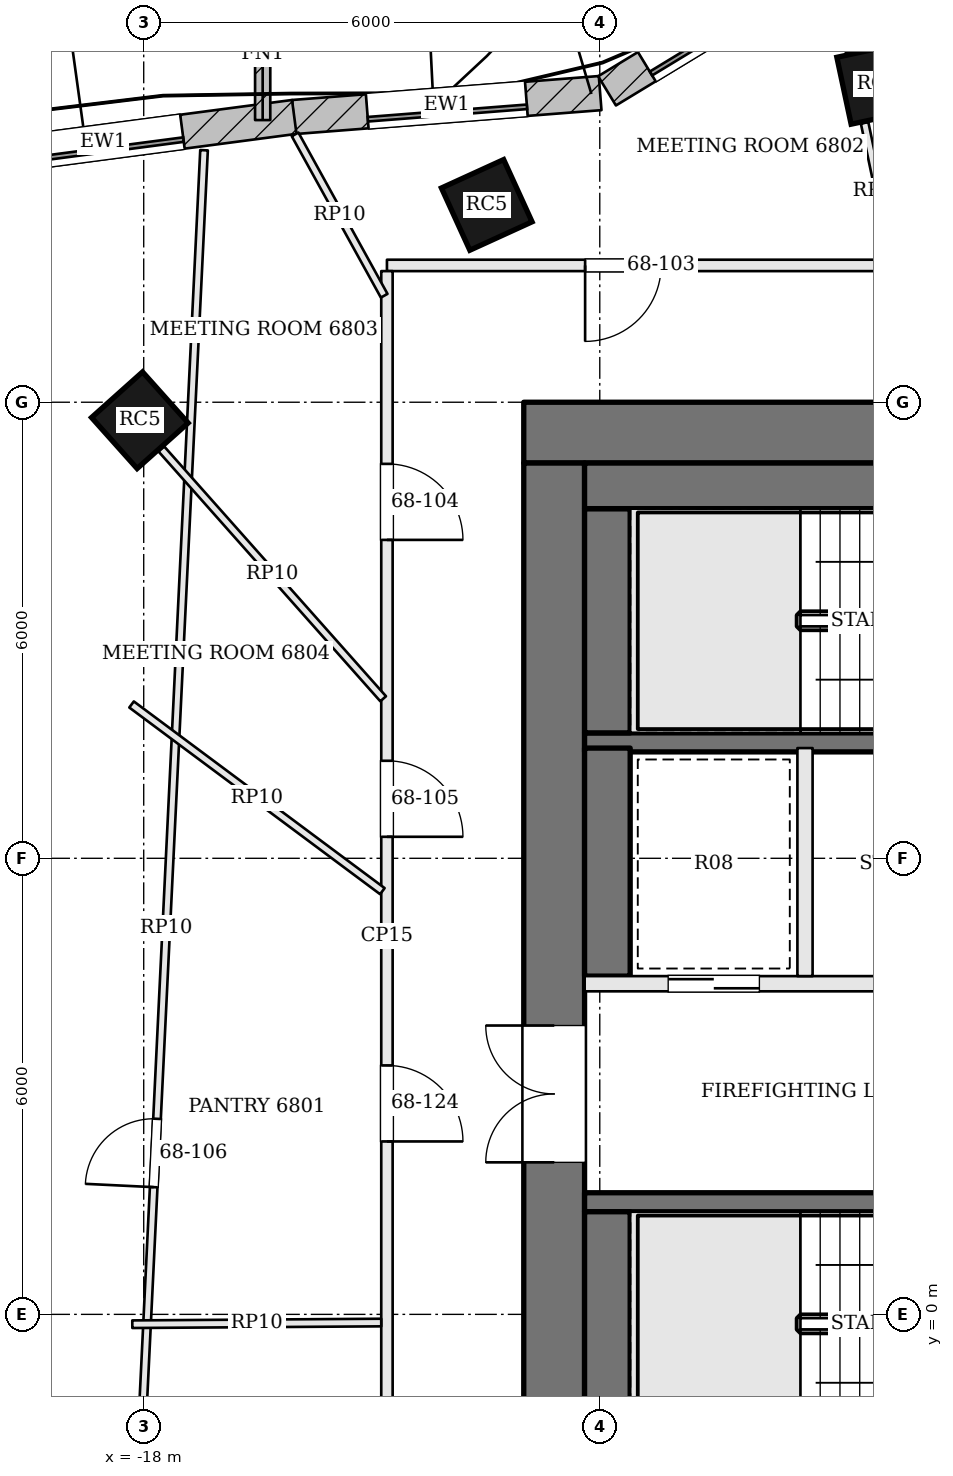
"""IFC4 building model, lengths in metres.
Left out: names, types, materials, properties, quantities, classifications, styles, units other than length and angle.
Written with IfcOpenShell. Run it as: python <this file> out.ifc"""

import sys

from ifc_helpers import new_model, si_unit, direction, frame, frame_2d, origin, origin_2d, place, context, subcontext, project, spatial, rectangle, extrude, element, fill, save


model = new_model("IFC4")
c1 = context("Model", 3, precision=1e-05, world=origin(), true_north=direction((0.0, 1.0)))
c2 = subcontext(c1, "Body", "Model", "MODEL_VIEW")
j1 = project(units=[si_unit("LENGTHUNIT", "METRE"), si_unit("PLANEANGLEUNIT", "RADIAN")], contexts=[c1])
p1 = place(None, origin())
s1 = spatial("IfcSite", under=j1, at=p1, CompositionType="ELEMENT")
p2 = place(p1, origin())
s2 = spatial("IfcBuilding", under=s1, at=p2, CompositionType="ELEMENT")
p3 = place(p2, frame((0.0, 0.0, 276.6)))
s3 = spatial("IfcBuildingStorey", under=s2, at=p3, CompositionType="ELEMENT", Elevation=276.6)
p4 = place(p3, frame((-13.0, 11.6, 0.0), z_axis=(0.0, 0.0, 1.0), x_axis=(1.0, 0.0, 0.0)))
e1 = element("IfcWall", 1, at=p4, inside=s3, PredefinedType="SHEAR", context=c2, shape_type="SweptSolid", body=[
    extrude(rectangle(XDim=26.0, YDim=0.8, at=frame_2d((13.0, 0.0))), origin(), (0.0, 0.0, 1.0), 3.9),
])
p5 = place(p4, frame((9.225, 0.0, 0.0)))
e2 = element("IfcOpeningElement", 2, at=p5, cuts=e1, PredefinedType="OPENING", context=c2, shape_type="SweptSolid", body=[
    extrude(rectangle(XDim=1.0, YDim=2.1, at=frame_2d((0.5, 1.05))), frame((0.0, 0.41, 0.0), z_axis=(0.0, -1.0, 0.0), x_axis=(1.0, 0.0, 0.0)), (0.0, 0.0, 1.0), 0.82),
])
p6 = place(p4, frame((11.825, 0.0, 0.0)))
e3 = element("IfcOpeningElement", 3, at=p6, cuts=e1, PredefinedType="OPENING", context=c2, shape_type="SweptSolid", body=[
    extrude(rectangle(XDim=0.7, YDim=2.1, at=frame_2d((0.35, 1.05))), frame((0.0, 0.41, 0.0), z_axis=(0.0, -1.0, 0.0), x_axis=(1.0, 0.0, 0.0)), (0.0, 0.0, 1.0), 0.82),
])
p7 = place(p4, frame((14.125, 0.0, 0.0)))
e4 = element("IfcOpeningElement", 4, at=p7, cuts=e1, PredefinedType="OPENING", context=c2, shape_type="SweptSolid", body=[
    extrude(rectangle(XDim=1.0, YDim=2.1, at=frame_2d((0.5, 1.05))), frame((0.0, 0.41, 0.0), z_axis=(0.0, -1.0, 0.0), x_axis=(1.0, 0.0, 0.0)), (0.0, 0.0, 1.0), 0.82),
])
p8 = place(p4, frame((16.625, 0.0, 0.0)))
e5 = element("IfcOpeningElement", 5, at=p8, cuts=e1, PredefinedType="OPENING", context=c2, shape_type="SweptSolid", body=[
    extrude(rectangle(XDim=0.9, YDim=2.1, at=frame_2d((0.45, 1.05))), frame((0.0, 0.41, 0.0), z_axis=(0.0, -1.0, 0.0), x_axis=(1.0, 0.0, 0.0)), (0.0, 0.0, 1.0), 0.82),
])
p9 = place(p3, frame((-12.6, -2.2, 0.0), z_axis=(0.0, 0.0, 1.0), x_axis=(0.0, 1.0, 0.0)))
e6 = element("IfcWall", 6, at=p9, inside=s3, PredefinedType="SHEAR", context=c2, shape_type="SweptSolid", body=[
    extrude(rectangle(XDim=13.4, YDim=0.8, at=frame_2d((6.7, 0.0))), origin(), (0.0, 0.0, 1.0), 3.9),
])
p10 = place(p9, frame((4.2, 0.0, 0.0)))
e7 = element("IfcOpeningElement", 7, at=p10, cuts=e6, PredefinedType="OPENING", context=c2, shape_type="SweptSolid", body=[
    extrude(rectangle(XDim=1.8, YDim=2.1, at=frame_2d((0.9, 1.05))), frame((0.0, 0.41, 0.0), z_axis=(0.0, -1.0, 0.0), x_axis=(1.0, 0.0, 0.0)), (0.0, 0.0, 1.0), 0.82),
])
for number, where, z_axis, x_axis in (
    (8, (-8.347, 16.192, 0.0), (0.0, 0.0, 1.0), (-0.978, -0.209, 0.0)),
    (9, (-13.487, 14.596, 0.0), (0.0, 0.0, 1.0), (-0.91, -0.415, 0.0)),
    (10, (-18.051, 11.763, 0.0), (0.0, 0.0, 1.0), (-0.746, -0.666, 0.0)),
):
    element("IfcColumn", number, at=place(p3, frame(where, z_axis=z_axis, x_axis=x_axis)), inside=s3, PredefinedType="COLUMN", context=c2, shape_type="SweptSolid", body=[
        extrude(rectangle(XDim=0.9, YDim=0.9, at=origin_2d()), origin(), (0.0, 0.0, 1.0), 3.9),
    ])
p11 = place(p3, frame((-9.063, 17.823, 0.0), z_axis=(0.0, 0.0, 1.0), x_axis=(-0.854622263029, -0.519250216693, 0.0)))
e11 = element("IfcWall", 11, at=p11, inside=s3, PredefinedType="SOLIDWALL", context=c2, shape_type="SweptSolid", body=[
    extrude(rectangle(XDim=3.325, YDim=0.45, at=frame_2d((1.662, 0.0))), origin(), (0.0, 0.0, 1.0), 3.7),
])
p12 = place(p11, frame((0.612, 0.0, 0.9)))
e12 = element("IfcOpeningElement", 12, at=p12, cuts=e11, PredefinedType="OPENING", context=c2, shape_type="SweptSolid", body=[
    extrude(rectangle(XDim=2.1, YDim=2.3, at=frame_2d((1.05, 1.15))), frame((0.0, 0.235, 0.0), z_axis=(0.0, -1.0, 0.0), x_axis=(1.0, 0.0, 0.0)), (0.0, 0.0, 1.0), 0.47),
])
p13 = place(p3, frame((-11.995, 16.067, 0.0), z_axis=(0.0, 0.0, 1.0), x_axis=(-0.996967993416, -0.077812724559, 0.0)))
e13 = element("IfcWall", 13, at=p13, inside=s3, PredefinedType="SOLIDWALL", context=c2, shape_type="SweptSolid", body=[
    extrude(rectangle(XDim=4.047, YDim=0.45, at=frame_2d((2.024, 0.0))), origin(), (0.0, 0.0, 1.0), 3.7),
])
p14 = place(p13, frame((0.974, 0.0, 0.9)))
e14 = element("IfcOpeningElement", 14, at=p14, cuts=e13, PredefinedType="OPENING", context=c2, shape_type="SweptSolid", body=[
    extrude(rectangle(XDim=2.1, YDim=2.3, at=frame_2d((1.05, 1.15))), frame((0.0, 0.235, 0.0), z_axis=(0.0, -1.0, 0.0), x_axis=(1.0, 0.0, 0.0)), (0.0, 0.0, 1.0), 0.47),
])
p15 = place(p3, frame((-16.019, 15.753, 0.0), z_axis=(0.0, 0.0, 1.0), x_axis=(-0.991409967396, -0.130790965086, 0.0)))
e15 = element("IfcWall", 15, at=p15, inside=s3, PredefinedType="SOLIDWALL", context=c2, shape_type="SweptSolid", body=[
    extrude(rectangle(XDim=5.068, YDim=0.45, at=frame_2d((2.534, 0.0))), origin(), (0.0, 0.0, 1.0), 3.7),
])
p16 = place(p15, frame((1.484, 0.0, 0.9)))
e16 = element("IfcOpeningElement", 16, at=p16, cuts=e15, PredefinedType="OPENING", context=c2, shape_type="SweptSolid", body=[
    extrude(rectangle(XDim=2.1, YDim=2.3, at=frame_2d((1.05, 1.15))), frame((0.0, 0.235, 0.0), z_axis=(0.0, -1.0, 0.0), x_axis=(1.0, 0.0, 0.0)), (0.0, 0.0, 1.0), 0.47),
])
p17 = place(p3, frame((-16.435, 15.712, 0.0), z_axis=(0.0, 0.0, 1.0), x_axis=(0.000279017846, 0.999999961075, 0.0)))
e17 = element("IfcWall", 17, at=p17, inside=s3, PredefinedType="SOLIDWALL", context=c2, shape_type="SweptSolid", body=[
    extrude(rectangle(XDim=1.75, YDim=0.2, at=frame_2d((0.875, 0.0))), origin(), (0.0, 0.0, 1.0), 3.7),
])
p18 = place(p3, frame((-12.2, 1.475, 0.0), z_axis=(0.0, 0.0, 1.0), x_axis=(1.0, 0.0, 0.0)))
e18 = element("IfcWall", 18, at=p18, inside=s3, PredefinedType="SOLIDWALL", context=c2, shape_type="SweptSolid", body=[
    extrude(rectangle(XDim=7.1, YDim=0.25, at=frame_2d((3.55, 0.0))), origin(), (0.0, 0.0, 1.0), 3.7),
])
p19 = place(p18, frame((5.8, 0.0, 0.0)))
e19 = element("IfcOpeningElement", 19, at=p19, cuts=e18, PredefinedType="OPENING", context=c2, shape_type="SweptSolid", body=[
    extrude(rectangle(XDim=1.2, YDim=2.1, at=frame_2d((0.6, 1.05))), frame((0.0, 0.135, 0.0), z_axis=(0.0, -1.0, 0.0), x_axis=(1.0, 0.0, 0.0)), (0.0, 0.0, 1.0), 0.27),
])
p20 = place(p3, frame((-12.2, 4.35, 0.0), z_axis=(0.0, 0.0, 1.0), x_axis=(1.0, 0.0, 0.0)))
e20 = element("IfcWall", 20, at=p20, inside=s3, PredefinedType="SOLIDWALL", context=c2, shape_type="SweptSolid", body=[
    extrude(rectangle(XDim=7.1, YDim=0.2, at=frame_2d((3.55, 0.0))), origin(), (0.0, 0.0, 1.0), 3.7),
])
p21 = place(p20, frame((4.4, 0.0, 0.0)))
e21 = element("IfcOpeningElement", 21, at=p21, cuts=e20, PredefinedType="OPENING", context=c2, shape_type="SweptSolid", body=[
    extrude(rectangle(XDim=1.2, YDim=2.1, at=frame_2d((0.6, 1.05))), frame((0.0, 0.11, 0.0), z_axis=(0.0, -1.0, 0.0), x_axis=(1.0, 0.0, 0.0)), (0.0, 0.0, 1.0), 0.22),
])
p22 = place(p20, frame((1.1, 0.0, 0.0)))
e22 = element("IfcOpeningElement", 22, at=p22, cuts=e20, PredefinedType="OPENING", context=c2, shape_type="SweptSolid", body=[
    extrude(rectangle(XDim=1.2, YDim=2.1, at=frame_2d((0.6, 1.05))), frame((0.0, 0.11, 0.0), z_axis=(0.0, -1.0, 0.0), x_axis=(1.0, 0.0, 0.0)), (0.0, 0.0, 1.0), 0.22),
])
p23 = place(p3, frame((-12.2, 7.525, 0.0), z_axis=(0.0, 0.0, 1.0), x_axis=(1.0, 0.0, 0.0)))
e23 = element("IfcWall", 23, at=p23, inside=s3, PredefinedType="SOLIDWALL", context=c2, shape_type="SweptSolid", body=[
    extrude(rectangle(XDim=7.1, YDim=0.25, at=frame_2d((3.55, 0.0))), origin(), (0.0, 0.0, 1.0), 3.7),
])
p24 = place(p23, frame((5.8, 0.0, 0.0)))
e24 = element("IfcOpeningElement", 24, at=p24, cuts=e23, PredefinedType="OPENING", context=c2, shape_type="SweptSolid", body=[
    extrude(rectangle(XDim=1.2, YDim=2.1, at=frame_2d((0.6, 1.05))), frame((0.0, 0.135, 0.0), z_axis=(0.0, -1.0, 0.0), x_axis=(1.0, 0.0, 0.0)), (0.0, 0.0, 1.0), 0.27),
])
p25 = place(p3, frame((-9.3, 4.45, 0.0), z_axis=(0.0, 0.0, 1.0), x_axis=(0.0, 1.0, 0.0)))
e25 = element("IfcWall", 25, at=p25, inside=s3, PredefinedType="SOLIDWALL", context=c2, shape_type="SweptSolid", body=[
    extrude(rectangle(XDim=3.0, YDim=0.2, at=frame_2d((1.5, 0.0))), origin(), (0.0, 0.0, 1.0), 3.7),
])
p26 = place(p3, frame((-11.9, -1.6, 0.0), z_axis=(0.0, 0.0, 1.0), x_axis=(0.0, 1.0, 0.0)))
e26 = element("IfcWall", 26, at=p26, inside=s3, PredefinedType="SOLIDWALL", context=c2, shape_type="SweptSolid", body=[
    extrude(rectangle(XDim=2.95, YDim=0.6, at=frame_2d((1.475, 0.0))), origin(), (0.0, 0.0, 1.0), 3.7),
])
p27 = place(p3, frame((-11.9, 4.45, 0.0), z_axis=(0.0, 0.0, 1.0), x_axis=(0.0, 1.0, 0.0)))
e27 = element("IfcWall", 27, at=p27, inside=s3, PredefinedType="SOLIDWALL", context=c2, shape_type="SweptSolid", body=[
    extrude(rectangle(XDim=3.0, YDim=0.6, at=frame_2d((1.5, 0.0))), origin(), (0.0, 0.0, 1.0), 3.7),
])
p28 = place(p3, frame((-11.9, 7.65, 0.0), z_axis=(0.0, 0.0, 1.0), x_axis=(0.0, 1.0, 0.0)))
e28 = element("IfcWall", 28, at=p28, inside=s3, PredefinedType="SOLIDWALL", context=c2, shape_type="SweptSolid", body=[
    extrude(rectangle(XDim=2.95, YDim=0.6, at=frame_2d((1.475, 0.0))), origin(), (0.0, 0.0, 1.0), 3.7),
])
p29 = place(p3, frame((-12.2, 10.9, 0.0), z_axis=(0.0, 0.0, 1.0), x_axis=(1.0, 0.0, 0.0)))
e29 = element("IfcWall", 29, at=p29, inside=s3, PredefinedType="SOLIDWALL", context=c2, shape_type="SweptSolid", body=[
    extrude(rectangle(XDim=7.1, YDim=0.6, at=frame_2d((3.55, 0.0))), origin(), (0.0, 0.0, 1.0), 3.7),
])
p30 = place(p3, frame((2.662, 13.8, 0.0), z_axis=(0.0, 0.0, 1.0), x_axis=(-1.0, 0.0, 0.0)))
e30 = element("IfcWall", 30, at=p30, inside=s3, PredefinedType="PARTITIONING", context=c2, shape_type="SweptSolid", body=[
    extrude(rectangle(XDim=17.462, YDim=0.15, at=frame_2d((8.731, 0.0))), origin(), (0.0, 0.0, 1.0), 3.198),
])
p31 = place(p30, frame((3.204, 0.0, 0.0)))
e31 = element("IfcOpeningElement", 31, at=p31, cuts=e30, PredefinedType="OPENING", context=c2, shape_type="SweptSolid", body=[
    extrude(rectangle(XDim=1.8, YDim=2.1, at=frame_2d((0.9, 1.05))), frame((0.0, 0.085, 0.0), z_axis=(0.0, -1.0, 0.0), x_axis=(1.0, 0.0, 0.0)), (0.0, 0.0, 1.0), 0.17),
])
p32 = place(p30, frame((8.997, 0.0, 0.0)))
e32 = element("IfcOpeningElement", 32, at=p32, cuts=e30, PredefinedType="OPENING", context=c2, shape_type="SweptSolid", body=[
    extrude(rectangle(XDim=1.0, YDim=2.4, at=frame_2d((0.5, 1.2))), frame((0.0, 0.085, 0.0), z_axis=(0.0, -1.0, 0.0), x_axis=(1.0, 0.0, 0.0)), (0.0, 0.0, 1.0), 0.17),
])
p33 = place(p30, frame((13.855, 0.0, 0.0)))
e33 = element("IfcOpeningElement", 33, at=p33, cuts=e30, PredefinedType="OPENING", context=c2, shape_type="SweptSolid", body=[
    extrude(rectangle(XDim=1.0, YDim=2.4, at=frame_2d((0.5, 1.2))), frame((0.0, 0.085, 0.0), z_axis=(0.0, -1.0, 0.0), x_axis=(1.0, 0.0, 0.0)), (0.0, 0.0, 1.0), 0.17),
])
p34 = place(p3, frame((-14.8, 13.725, 0.0), z_axis=(0.0, 0.0, 1.0), x_axis=(0.0, -1.0, 0.0)))
e34 = element("IfcWall", 34, at=p34, inside=s3, PredefinedType="PARTITIONING", context=c2, shape_type="SweptSolid", body=[
    extrude(rectangle(XDim=17.5, YDim=0.15, at=frame_2d((8.75, 0.0))), origin(), (0.0, 0.0, 1.0), 3.198),
])
p35 = place(p34, frame((2.536, 0.0, 0.0)))
e35 = element("IfcOpeningElement", 35, at=p35, cuts=e34, PredefinedType="OPENING", context=c2, shape_type="SweptSolid", body=[
    extrude(rectangle(XDim=1.0, YDim=2.4, at=frame_2d((0.5, 1.2))), frame((0.0, 0.085, 0.0), z_axis=(0.0, -1.0, 0.0), x_axis=(1.0, 0.0, 0.0)), (0.0, 0.0, 1.0), 0.17),
])
p36 = place(p34, frame((6.442, 0.0, 0.0)))
e36 = element("IfcOpeningElement", 36, at=p36, cuts=e34, PredefinedType="OPENING", context=c2, shape_type="SweptSolid", body=[
    extrude(rectangle(XDim=1.0, YDim=2.4, at=frame_2d((0.5, 1.2))), frame((0.0, 0.085, 0.0), z_axis=(0.0, -1.0, 0.0), x_axis=(1.0, 0.0, 0.0)), (0.0, 0.0, 1.0), 0.17),
])
p37 = place(p34, frame((10.45, 0.0, 0.0)))
e37 = element("IfcOpeningElement", 37, at=p37, cuts=e34, PredefinedType="OPENING", context=c2, shape_type="SweptSolid", body=[
    extrude(rectangle(XDim=1.0, YDim=2.1, at=frame_2d((0.5, 1.05))), frame((0.0, 0.085, 0.0), z_axis=(0.0, -1.0, 0.0), x_axis=(1.0, 0.0, 0.0)), (0.0, 0.0, 1.0), 0.17),
])
p38 = place(p34, frame((15.05, 0.0, 0.0)))
e38 = element("IfcOpeningElement", 38, at=p38, cuts=e34, PredefinedType="OPENING", context=c2, shape_type="SweptSolid", body=[
    extrude(rectangle(XDim=1.0, YDim=2.1, at=frame_2d((0.5, 1.05))), frame((0.0, 0.085, 0.0), z_axis=(0.0, -1.0, 0.0), x_axis=(1.0, 0.0, 0.0)), (0.0, 0.0, 1.0), 0.17),
])
p39 = place(p3, frame((-18.2, -5.149, 0.0), z_axis=(0.0, 0.0, 1.0), x_axis=(0.048497558373, 0.998823301106, 0.0)))
e39 = element("IfcWall", 39, at=p39, inside=s3, PredefinedType="PARTITIONING", context=c2, shape_type="SweptSolid", body=[
    extrude(rectangle(XDim=20.489, YDim=0.1, at=frame_2d((10.244, 0.0))), origin(), (0.0, 0.0, 1.0), 3.184),
])
p40 = place(p39, frame((6.831, 0.0, 0.0)))
e40 = element("IfcOpeningElement", 40, at=p40, cuts=e39, PredefinedType="OPENING", context=c2, shape_type="SweptSolid", body=[
    extrude(rectangle(XDim=0.9, YDim=2.1, at=frame_2d((0.45, 1.05))), frame((0.0, 0.06, 0.0), z_axis=(0.0, -1.0, 0.0), x_axis=(1.0, 0.0, 0.0)), (0.0, 0.0, 1.0), 0.12),
])
p41 = place(p39, frame((1.56, 0.0, 0.0)))
e41 = element("IfcOpeningElement", 41, at=p41, cuts=e39, PredefinedType="OPENING", context=c2, shape_type="SweptSolid", body=[
    extrude(rectangle(XDim=0.9, YDim=2.1, at=frame_2d((0.45, 1.05))), frame((0.0, 0.06, 0.0), z_axis=(0.0, -1.0, 0.0), x_axis=(1.0, 0.0, 0.0)), (0.0, 0.0, 1.0), 0.12),
])
p42 = place(p3, frame((-8.137, 13.873, 0.0), z_axis=(0.0, 0.0, 1.0), x_axis=(-0.20551596438, 0.978653763282, 0.0)))
e42 = element("IfcWall", 42, at=p42, inside=s3, PredefinedType="PARTITIONING", context=c2, shape_type="SweptSolid", body=[
    extrude(rectangle(XDim=1.841, YDim=0.1, at=frame_2d((0.921, 0.0))), origin(), (0.0, 0.0, 1.0), 3.184),
])
p43 = place(p3, frame((-8.709, 16.595, 0.0), z_axis=(0.0, 0.0, 1.0), x_axis=(-0.205700213962, 0.978615053009, 0.0)))
e43 = element("IfcWall", 43, at=p43, inside=s3, PredefinedType="PARTITIONING", context=c2, shape_type="SweptSolid", body=[
    extrude(rectangle(XDim=1.15, YDim=0.1, at=frame_2d((0.575, 0.0))), origin(), (0.0, 0.0, 1.0), 3.184),
])
p44 = place(p3, frame((-14.836, 13.401, 0.0), z_axis=(0.0, 0.0, 1.0), x_axis=(-0.483487187132, 0.875351437926, 0.0)))
e44 = element("IfcWall", 44, at=p44, inside=s3, PredefinedType="PARTITIONING", context=c2, shape_type="SweptSolid", body=[
    extrude(rectangle(XDim=2.425, YDim=0.1, at=frame_2d((1.212, 0.0))), origin(), (0.0, 0.0, 1.0), 3.184),
])
p45 = place(p3, frame((-14.85, 8.099, 0.0), z_axis=(0.0, 0.0, 1.0), x_axis=(-0.663984515268, 0.747746322949, 0.0)))
e45 = element("IfcWall", 45, at=p45, inside=s3, PredefinedType="PARTITIONING", context=c2, shape_type="SweptSolid", body=[
    extrude(rectangle(XDim=4.395, YDim=0.1, at=frame_2d((2.198, 0.0))), origin(), (0.0, 0.0, 1.0), 3.184),
])
p46 = place(p3, frame((-14.86, 5.568, 0.0), z_axis=(0.0, 0.0, 1.0), x_axis=(-0.80221669382, 0.597032977444, 0.0)))
e46 = element("IfcWall", 46, at=p46, inside=s3, PredefinedType="PARTITIONING", context=c2, shape_type="SweptSolid", body=[
    extrude(rectangle(XDim=4.113, YDim=0.1, at=frame_2d((2.057, 0.0))), origin(), (0.0, 0.0, 1.0), 3.184),
])
p47 = place(p3, frame((-14.875, -0.107, 0.0), z_axis=(0.0, 0.0, 1.0), x_axis=(-0.999977492681, -0.00670925707, 0.0)))
e47 = element("IfcWall", 47, at=p47, inside=s3, PredefinedType="PARTITIONING", context=c2, shape_type="SweptSolid", body=[
    extrude(rectangle(XDim=3.275, YDim=0.1, at=frame_2d((1.637, 0.0))), origin(), (0.0, 0.0, 1.0), 3.184),
])
p48 = place(p12, origin())
e48 = element("IfcWindow", 48, at=p48, inside=s3, PartitioningType="SINGLE_PANEL", PredefinedType="WINDOW", context=c2, shape_type="SweptSolid", body=[
    extrude(rectangle(XDim=2.1, YDim=2.3, at=frame_2d((1.05, 1.15))), frame((0.0, 0.135, 0.0), z_axis=(0.0, -1.0, 0.0), x_axis=(1.0, 0.0, 0.0)), (0.0, 0.0, 1.0), 0.06),
])
fill(e12, e48)
p49 = place(p14, origin())
e49 = element("IfcWindow", 49, at=p49, inside=s3, PartitioningType="SINGLE_PANEL", PredefinedType="WINDOW", context=c2, shape_type="SweptSolid", body=[
    extrude(rectangle(XDim=2.1, YDim=2.3, at=frame_2d((1.05, 1.15))), frame((0.0, 0.135, 0.0), z_axis=(0.0, -1.0, 0.0), x_axis=(1.0, 0.0, 0.0)), (0.0, 0.0, 1.0), 0.06),
])
fill(e14, e49)
p50 = place(p16, origin())
e50 = element("IfcWindow", 50, at=p50, inside=s3, PartitioningType="SINGLE_PANEL", PredefinedType="WINDOW", context=c2, shape_type="SweptSolid", body=[
    extrude(rectangle(XDim=2.1, YDim=2.3, at=frame_2d((1.05, 1.15))), frame((0.0, 0.135, 0.0), z_axis=(0.0, -1.0, 0.0), x_axis=(1.0, 0.0, 0.0)), (0.0, 0.0, 1.0), 0.06),
])
fill(e16, e50)
p51 = place(p10, origin())
e51 = element("IfcDoor", 51, at=p51, inside=s3, OperationType="DOUBLE_DOOR_SINGLE_SWING", PredefinedType="DOOR", context=c2, shape_type="SweptSolid", body=[
    extrude(rectangle(XDim=1.8, YDim=2.1, at=frame_2d((0.9, 1.05))), frame((0.0, 0.025, 0.0), z_axis=(0.0, -1.0, 0.0), x_axis=(1.0, 0.0, 0.0)), (0.0, 0.0, 1.0), 0.05),
])
fill(e7, e51)
p52 = place(p22, origin())
e52 = element("IfcDoor", 52, at=p52, inside=s3, OperationType="SLIDING_TO_RIGHT", PredefinedType="DOOR", context=c2, shape_type="SweptSolid", body=[
    extrude(rectangle(XDim=1.2, YDim=2.1, at=frame_2d((0.6, 1.05))), frame((0.0, 0.025, 0.0), z_axis=(0.0, -1.0, 0.0), x_axis=(1.0, 0.0, 0.0)), (0.0, 0.0, 1.0), 0.05),
])
fill(e22, e52)
p53 = place(p33, origin())
e53 = element("IfcDoor", 53, at=p53, inside=s3, OperationType="SINGLE_SWING_RIGHT", PredefinedType="DOOR", context=c2, shape_type="SweptSolid", body=[
    extrude(rectangle(XDim=1.0, YDim=2.4, at=frame_2d((0.5, 1.2))), frame((0.0, 0.025, 0.0), z_axis=(0.0, -1.0, 0.0), x_axis=(1.0, 0.0, 0.0)), (0.0, 0.0, 1.0), 0.05),
])
fill(e33, e53)
p54 = place(p35, origin())
e54 = element("IfcDoor", 54, at=p54, inside=s3, OperationType="SINGLE_SWING_RIGHT", PredefinedType="DOOR", context=c2, shape_type="SweptSolid", body=[
    extrude(rectangle(XDim=1.0, YDim=2.4, at=frame_2d((0.5, 1.2))), frame((0.0, 0.025, 0.0), z_axis=(0.0, -1.0, 0.0), x_axis=(1.0, 0.0, 0.0)), (0.0, 0.0, 1.0), 0.05),
])
fill(e35, e54)
p55 = place(p36, origin())
e55 = element("IfcDoor", 55, at=p55, inside=s3, OperationType="SINGLE_SWING_RIGHT", PredefinedType="DOOR", context=c2, shape_type="SweptSolid", body=[
    extrude(rectangle(XDim=1.0, YDim=2.4, at=frame_2d((0.5, 1.2))), frame((0.0, 0.025, 0.0), z_axis=(0.0, -1.0, 0.0), x_axis=(1.0, 0.0, 0.0)), (0.0, 0.0, 1.0), 0.05),
])
fill(e36, e55)
p56 = place(p40, origin())
e56 = element("IfcDoor", 56, at=p56, inside=s3, OperationType="SINGLE_SWING_LEFT", PredefinedType="DOOR", context=c2, shape_type="SweptSolid", body=[
    extrude(rectangle(XDim=0.9, YDim=2.1, at=frame_2d((0.45, 1.05))), frame((0.0, 0.025, 0.0), z_axis=(0.0, -1.0, 0.0), x_axis=(1.0, 0.0, 0.0)), (0.0, 0.0, 1.0), 0.05),
])
fill(e40, e56)
p57 = place(p37, origin())
e57 = element("IfcDoor", 57, at=p57, inside=s3, OperationType="SINGLE_SWING_RIGHT", PredefinedType="DOOR", context=c2, shape_type="SweptSolid", body=[
    extrude(rectangle(XDim=1.0, YDim=2.1, at=frame_2d((0.5, 1.05))), frame((0.0, 0.025, 0.0), z_axis=(0.0, -1.0, 0.0), x_axis=(1.0, 0.0, 0.0)), (0.0, 0.0, 1.0), 0.05),
])
fill(e37, e57)
save(model, sys.argv[1])
